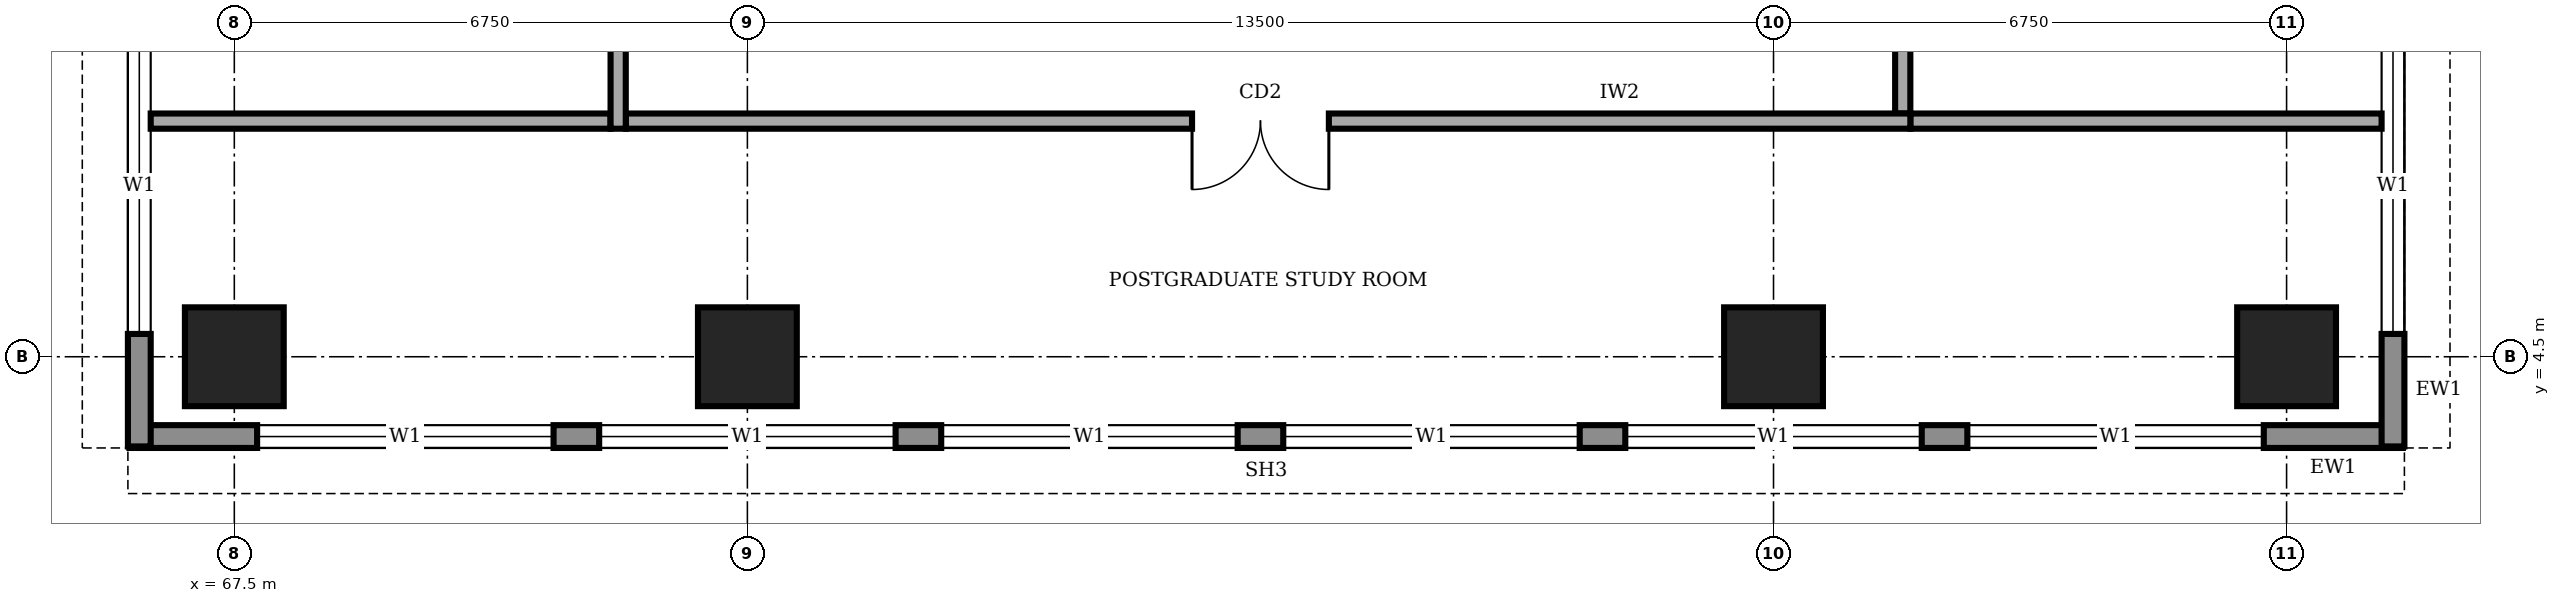
"""IFC4 building model, lengths in metres.
Left out: names, types, materials, properties, quantities, classifications, styles, units other than length and angle.
Written with IfcOpenShell. Run it as: python <this file> out.ifc"""

import sys

from ifc_helpers import new_model, si_unit, direction, frame, frame_2d, origin, origin_2d, place, context, subcontext, project, spatial, rectangle, extrude, element, fill, save


model = new_model("IFC4")
c1 = context("Model", 3, precision=1e-05, world=origin(), true_north=direction((0.0, 1.0)))
c2 = subcontext(c1, "Body", "Model", "MODEL_VIEW")
j1 = project(units=[si_unit("LENGTHUNIT", "METRE"), si_unit("PLANEANGLEUNIT", "RADIAN")], contexts=[c1])
p1 = place(None, origin())
s1 = spatial("IfcSite", under=j1, at=p1, CompositionType="ELEMENT")
p2 = place(p1, origin())
s2 = spatial("IfcBuilding", under=s1, at=p2, CompositionType="ELEMENT")
p3 = place(p2, frame((0.0, 0.0, 213.0)))
s3 = spatial("IfcBuildingStorey", under=s2, at=p3, CompositionType="ELEMENT", Elevation=213.0)
for number, where, z_axis, x_axis in (
    (1, (67.5, 4.5, 0.0), (0.0, 0.0, 1.0), (1.0, 0.0, 0.0)),
    (2, (74.25, 4.5, 0.0), (0.0, 0.0, 1.0), (1.0, 0.0, 0.0)),
    (3, (87.75, 4.5, 0.0), (0.0, 0.0, 1.0), (1.0, 0.0, 0.0)),
    (4, (94.5, 4.5, 0.0), (0.0, 0.0, 1.0), (1.0, 0.0, 0.0)),
):
    element("IfcColumn", number, at=place(p3, frame(where, z_axis=z_axis, x_axis=x_axis)), inside=s3, PredefinedType="COLUMN", context=c2, shape_type="SweptSolid", body=[
        extrude(rectangle(XDim=1.3, YDim=1.3, at=origin_2d()), origin(), (0.0, 0.0, 1.0), 4.0),
    ])
p4 = place(p3, frame((66.12, 3.45, 0.0), z_axis=(0.0, 0.0, 1.0), x_axis=(1.0, 0.0, 0.0)))
e5 = element("IfcWall", 5, at=p4, inside=s3, PredefinedType="STANDARD", context=c2, shape_type="SweptSolid", body=[
    extrude(rectangle(XDim=29.91, YDim=0.3, at=frame_2d((14.955, 0.0))), origin(), (0.0, 0.0, 1.0), 3.75),
])
p5 = place(p4, frame((1.68, 0.0, 0.9)))
e6 = element("IfcOpeningElement", 6, at=p5, cuts=e5, PredefinedType="OPENING", context=c2, shape_type="SweptSolid", body=[
    extrude(rectangle(XDim=3.9, YDim=2.2, at=frame_2d((1.95, 1.1))), frame((0.0, 0.16, 0.0), z_axis=(0.0, -1.0, 0.0), x_axis=(1.0, 0.0, 0.0)), (0.0, 0.0, 1.0), 0.32),
])
p6 = place(p4, frame((6.18, 0.0, 0.9)))
e7 = element("IfcOpeningElement", 7, at=p6, cuts=e5, PredefinedType="OPENING", context=c2, shape_type="SweptSolid", body=[
    extrude(rectangle(XDim=3.9, YDim=2.2, at=frame_2d((1.95, 1.1))), frame((0.0, 0.16, 0.0), z_axis=(0.0, -1.0, 0.0), x_axis=(1.0, 0.0, 0.0)), (0.0, 0.0, 1.0), 0.32),
])
p7 = place(p4, frame((10.68, 0.0, 0.9)))
e8 = element("IfcOpeningElement", 8, at=p7, cuts=e5, PredefinedType="OPENING", context=c2, shape_type="SweptSolid", body=[
    extrude(rectangle(XDim=3.9, YDim=2.2, at=frame_2d((1.95, 1.1))), frame((0.0, 0.16, 0.0), z_axis=(0.0, -1.0, 0.0), x_axis=(1.0, 0.0, 0.0)), (0.0, 0.0, 1.0), 0.32),
])
p8 = place(p4, frame((15.18, 0.0, 0.9)))
e9 = element("IfcOpeningElement", 9, at=p8, cuts=e5, PredefinedType="OPENING", context=c2, shape_type="SweptSolid", body=[
    extrude(rectangle(XDim=3.9, YDim=2.2, at=frame_2d((1.95, 1.1))), frame((0.0, 0.16, 0.0), z_axis=(0.0, -1.0, 0.0), x_axis=(1.0, 0.0, 0.0)), (0.0, 0.0, 1.0), 0.32),
])
p9 = place(p4, frame((19.68, 0.0, 0.9)))
e10 = element("IfcOpeningElement", 10, at=p9, cuts=e5, PredefinedType="OPENING", context=c2, shape_type="SweptSolid", body=[
    extrude(rectangle(XDim=3.9, YDim=2.2, at=frame_2d((1.95, 1.1))), frame((0.0, 0.16, 0.0), z_axis=(0.0, -1.0, 0.0), x_axis=(1.0, 0.0, 0.0)), (0.0, 0.0, 1.0), 0.32),
])
p10 = place(p4, frame((24.18, 0.0, 0.9)))
e11 = element("IfcOpeningElement", 11, at=p10, cuts=e5, PredefinedType="OPENING", context=c2, shape_type="SweptSolid", body=[
    extrude(rectangle(XDim=3.9, YDim=2.2, at=frame_2d((1.95, 1.1))), frame((0.0, 0.16, 0.0), z_axis=(0.0, -1.0, 0.0), x_axis=(1.0, 0.0, 0.0)), (0.0, 0.0, 1.0), 0.32),
])
p11 = place(p3, frame((95.9, 3.32, 0.0), z_axis=(0.0, 0.0, 1.0), x_axis=(0.0, 1.0, 0.0)))
e12 = element("IfcWall", 12, at=p11, inside=s3, PredefinedType="STANDARD", context=c2, shape_type="SweptSolid", body=[
    extrude(rectangle(XDim=33.86, YDim=0.3, at=frame_2d((16.93, 0.0))), origin(), (0.0, 0.0, 1.0), 3.75),
])
p12 = place(p11, frame((1.48, 0.0, 0.9)))
e13 = element("IfcOpeningElement", 13, at=p12, cuts=e12, PredefinedType="OPENING", context=c2, shape_type="SweptSolid", body=[
    extrude(rectangle(XDim=3.9, YDim=2.2, at=frame_2d((1.95, 1.1))), frame((0.0, 0.16, 0.0), z_axis=(0.0, -1.0, 0.0), x_axis=(1.0, 0.0, 0.0)), (0.0, 0.0, 1.0), 0.32),
])
p13 = place(p11, frame((5.98, 0.0, 0.9)))
e14 = element("IfcOpeningElement", 14, at=p13, cuts=e12, PredefinedType="OPENING", context=c2, shape_type="SweptSolid", body=[
    extrude(rectangle(XDim=3.9, YDim=2.2, at=frame_2d((1.95, 1.1))), frame((0.0, 0.16, 0.0), z_axis=(0.0, -1.0, 0.0), x_axis=(1.0, 0.0, 0.0)), (0.0, 0.0, 1.0), 0.32),
])
p14 = place(p11, frame((10.48, 0.0, 0.9)))
e15 = element("IfcOpeningElement", 15, at=p14, cuts=e12, PredefinedType="OPENING", context=c2, shape_type="SweptSolid", body=[
    extrude(rectangle(XDim=3.9, YDim=2.2, at=frame_2d((1.95, 1.1))), frame((0.0, 0.16, 0.0), z_axis=(0.0, -1.0, 0.0), x_axis=(1.0, 0.0, 0.0)), (0.0, 0.0, 1.0), 0.32),
])
p15 = place(p11, frame((14.98, 0.0, 0.9)))
e16 = element("IfcOpeningElement", 16, at=p15, cuts=e12, PredefinedType="OPENING", context=c2, shape_type="SweptSolid", body=[
    extrude(rectangle(XDim=3.9, YDim=2.2, at=frame_2d((1.95, 1.1))), frame((0.0, 0.16, 0.0), z_axis=(0.0, -1.0, 0.0), x_axis=(1.0, 0.0, 0.0)), (0.0, 0.0, 1.0), 0.32),
])
p16 = place(p11, frame((19.48, 0.0, 0.9)))
e17 = element("IfcOpeningElement", 17, at=p16, cuts=e12, PredefinedType="OPENING", context=c2, shape_type="SweptSolid", body=[
    extrude(rectangle(XDim=3.9, YDim=2.2, at=frame_2d((1.95, 1.1))), frame((0.0, 0.16, 0.0), z_axis=(0.0, -1.0, 0.0), x_axis=(1.0, 0.0, 0.0)), (0.0, 0.0, 1.0), 0.32),
])
p17 = place(p11, frame((23.98, 0.0, 0.9)))
e18 = element("IfcOpeningElement", 18, at=p17, cuts=e12, PredefinedType="OPENING", context=c2, shape_type="SweptSolid", body=[
    extrude(rectangle(XDim=3.9, YDim=2.2, at=frame_2d((1.95, 1.1))), frame((0.0, 0.16, 0.0), z_axis=(0.0, -1.0, 0.0), x_axis=(1.0, 0.0, 0.0)), (0.0, 0.0, 1.0), 0.32),
])
p18 = place(p11, frame((28.48, 0.0, 0.9)))
e19 = element("IfcOpeningElement", 19, at=p18, cuts=e12, PredefinedType="OPENING", context=c2, shape_type="SweptSolid", body=[
    extrude(rectangle(XDim=3.9, YDim=2.2, at=frame_2d((1.95, 1.1))), frame((0.0, 0.16, 0.0), z_axis=(0.0, -1.0, 0.0), x_axis=(1.0, 0.0, 0.0)), (0.0, 0.0, 1.0), 0.32),
])
p19 = place(p3, frame((66.25, 37.18, 0.0), z_axis=(0.0, 0.0, 1.0), x_axis=(0.0, -1.0, 0.0)))
e20 = element("IfcWall", 20, at=p19, inside=s3, PredefinedType="STANDARD", context=c2, shape_type="SweptSolid", body=[
    extrude(rectangle(XDim=33.86, YDim=0.3, at=frame_2d((16.93, 0.0))), origin(), (0.0, 0.0, 1.0), 3.75),
])
p20 = place(p19, frame((28.48, 0.0, 0.9)))
e21 = element("IfcOpeningElement", 21, at=p20, cuts=e20, PredefinedType="OPENING", context=c2, shape_type="SweptSolid", body=[
    extrude(rectangle(XDim=3.9, YDim=2.2, at=frame_2d((1.95, 1.1))), frame((0.0, 0.16, 0.0), z_axis=(0.0, -1.0, 0.0), x_axis=(1.0, 0.0, 0.0)), (0.0, 0.0, 1.0), 0.32),
])
p21 = place(p19, frame((23.98, 0.0, 0.9)))
e22 = element("IfcOpeningElement", 22, at=p21, cuts=e20, PredefinedType="OPENING", context=c2, shape_type="SweptSolid", body=[
    extrude(rectangle(XDim=3.9, YDim=2.2, at=frame_2d((1.95, 1.1))), frame((0.0, 0.16, 0.0), z_axis=(0.0, -1.0, 0.0), x_axis=(1.0, 0.0, 0.0)), (0.0, 0.0, 1.0), 0.32),
])
p22 = place(p19, frame((19.48, 0.0, 0.9)))
e23 = element("IfcOpeningElement", 23, at=p22, cuts=e20, PredefinedType="OPENING", context=c2, shape_type="SweptSolid", body=[
    extrude(rectangle(XDim=3.9, YDim=2.2, at=frame_2d((1.95, 1.1))), frame((0.0, 0.16, 0.0), z_axis=(0.0, -1.0, 0.0), x_axis=(1.0, 0.0, 0.0)), (0.0, 0.0, 1.0), 0.32),
])
p23 = place(p19, frame((14.98, 0.0, 0.9)))
e24 = element("IfcOpeningElement", 24, at=p23, cuts=e20, PredefinedType="OPENING", context=c2, shape_type="SweptSolid", body=[
    extrude(rectangle(XDim=3.9, YDim=2.2, at=frame_2d((1.95, 1.1))), frame((0.0, 0.16, 0.0), z_axis=(0.0, -1.0, 0.0), x_axis=(1.0, 0.0, 0.0)), (0.0, 0.0, 1.0), 0.32),
])
p24 = place(p19, frame((10.48, 0.0, 0.9)))
e25 = element("IfcOpeningElement", 25, at=p24, cuts=e20, PredefinedType="OPENING", context=c2, shape_type="SweptSolid", body=[
    extrude(rectangle(XDim=3.9, YDim=2.2, at=frame_2d((1.95, 1.1))), frame((0.0, 0.16, 0.0), z_axis=(0.0, -1.0, 0.0), x_axis=(1.0, 0.0, 0.0)), (0.0, 0.0, 1.0), 0.32),
])
p25 = place(p19, frame((5.98, 0.0, 0.9)))
e26 = element("IfcOpeningElement", 26, at=p25, cuts=e20, PredefinedType="OPENING", context=c2, shape_type="SweptSolid", body=[
    extrude(rectangle(XDim=3.9, YDim=2.2, at=frame_2d((1.95, 1.1))), frame((0.0, 0.16, 0.0), z_axis=(0.0, -1.0, 0.0), x_axis=(1.0, 0.0, 0.0)), (0.0, 0.0, 1.0), 0.32),
])
p26 = place(p19, frame((1.48, 0.0, 0.9)))
e27 = element("IfcOpeningElement", 27, at=p26, cuts=e20, PredefinedType="OPENING", context=c2, shape_type="SweptSolid", body=[
    extrude(rectangle(XDim=3.9, YDim=2.2, at=frame_2d((1.95, 1.1))), frame((0.0, 0.16, 0.0), z_axis=(0.0, -1.0, 0.0), x_axis=(1.0, 0.0, 0.0)), (0.0, 0.0, 1.0), 0.32),
])
p27 = place(p3, frame((72.65, 7.6, 0.0), z_axis=(0.0, 0.0, 1.0), x_axis=(1.0, 0.0, 0.0)))
e28 = element("IfcWall", 28, at=p27, inside=s3, PredefinedType="SOLIDWALL", context=c2, shape_type="SweptSolid", body=[
    extrude(rectangle(XDim=16.9, YDim=0.2, at=frame_2d((8.45, 0.0))), origin(), (0.0, 0.0, 1.0), 3.75),
])
p28 = place(p27, frame((7.45, 0.0, 0.0)))
e29 = element("IfcOpeningElement", 29, at=p28, cuts=e28, PredefinedType="OPENING", context=c2, shape_type="SweptSolid", body=[
    extrude(rectangle(XDim=1.8, YDim=2.1, at=frame_2d((0.9, 1.05))), frame((0.0, 0.11, 0.0), z_axis=(0.0, -1.0, 0.0), x_axis=(1.0, 0.0, 0.0)), (0.0, 0.0, 1.0), 0.22),
])
p29 = place(p3, frame((89.45, 7.7, 0.0), z_axis=(0.0, 0.0, 1.0), x_axis=(0.0, 1.0, 0.0)))
e30 = element("IfcWall", 30, at=p29, inside=s3, PredefinedType="SOLIDWALL", context=c2, shape_type="SweptSolid", body=[
    extrude(rectangle(XDim=23.8, YDim=0.2, at=frame_2d((11.9, 0.0))), origin(), (0.0, 0.0, 1.0), 3.75),
])
p30 = place(p29, frame((2.3, 0.0, 0.0)))
e31 = element("IfcOpeningElement", 31, at=p30, cuts=e30, PredefinedType="OPENING", context=c2, shape_type="SweptSolid", body=[
    extrude(rectangle(XDim=1.0, YDim=2.1, at=frame_2d((0.5, 1.05))), frame((0.0, 0.11, 0.0), z_axis=(0.0, -1.0, 0.0), x_axis=(1.0, 0.0, 0.0)), (0.0, 0.0, 1.0), 0.22),
])
p31 = place(p29, frame((7.05, 0.0, 0.0)))
e32 = element("IfcOpeningElement", 32, at=p31, cuts=e30, PredefinedType="OPENING", context=c2, shape_type="SweptSolid", body=[
    extrude(rectangle(XDim=0.9, YDim=2.1, at=frame_2d((0.45, 1.05))), frame((0.0, 0.11, 0.0), z_axis=(0.0, -1.0, 0.0), x_axis=(1.0, 0.0, 0.0)), (0.0, 0.0, 1.0), 0.22),
])
p32 = place(p29, frame((11.85, 0.0, 0.0)))
e33 = element("IfcOpeningElement", 33, at=p32, cuts=e30, PredefinedType="OPENING", context=c2, shape_type="SweptSolid", body=[
    extrude(rectangle(XDim=0.9, YDim=2.1, at=frame_2d((0.45, 1.05))), frame((0.0, 0.11, 0.0), z_axis=(0.0, -1.0, 0.0), x_axis=(1.0, 0.0, 0.0)), (0.0, 0.0, 1.0), 0.22),
])
p33 = place(p29, frame((14.9, 0.0, 0.0)))
e34 = element("IfcOpeningElement", 34, at=p33, cuts=e30, PredefinedType="OPENING", context=c2, shape_type="SweptSolid", body=[
    extrude(rectangle(XDim=0.9, YDim=2.1, at=frame_2d((0.45, 1.05))), frame((0.0, 0.11, 0.0), z_axis=(0.0, -1.0, 0.0), x_axis=(1.0, 0.0, 0.0)), (0.0, 0.0, 1.0), 0.22),
])
p34 = place(p29, frame((17.8, 0.0, 0.0)))
e35 = element("IfcOpeningElement", 35, at=p34, cuts=e30, PredefinedType="OPENING", context=c2, shape_type="SweptSolid", body=[
    extrude(rectangle(XDim=1.0, YDim=2.1, at=frame_2d((0.5, 1.05))), frame((0.0, 0.11, 0.0), z_axis=(0.0, -1.0, 0.0), x_axis=(1.0, 0.0, 0.0)), (0.0, 0.0, 1.0), 0.22),
])
p35 = place(p29, frame((9.7, 0.0, 0.0)))
e36 = element("IfcOpeningElement", 36, at=p35, cuts=e30, PredefinedType="OPENING", context=c2, shape_type="SweptSolid", body=[
    extrude(rectangle(XDim=1.0, YDim=2.1, at=frame_2d((0.5, 1.05))), frame((0.0, 0.11, 0.0), z_axis=(0.0, -1.0, 0.0), x_axis=(1.0, 0.0, 0.0)), (0.0, 0.0, 1.0), 0.22),
])
p36 = place(p29, frame((21.05, 0.0, 0.0)))
e37 = element("IfcOpeningElement", 37, at=p36, cuts=e30, PredefinedType="OPENING", context=c2, shape_type="SweptSolid", body=[
    extrude(rectangle(XDim=1.0, YDim=2.1, at=frame_2d((0.5, 1.05))), frame((0.0, 0.11, 0.0), z_axis=(0.0, -1.0, 0.0), x_axis=(1.0, 0.0, 0.0)), (0.0, 0.0, 1.0), 0.22),
])
p37 = place(p3, frame((72.55, 31.3, 0.0), z_axis=(0.0, 0.0, 1.0), x_axis=(0.0, -1.0, 0.0)))
e38 = element("IfcWall", 38, at=p37, inside=s3, PredefinedType="SOLIDWALL", context=c2, shape_type="SweptSolid", body=[
    extrude(rectangle(XDim=23.8, YDim=0.2, at=frame_2d((11.9, 0.0))), origin(), (0.0, 0.0, 1.0), 3.75),
])
p38 = place(p37, frame((18.05, 0.0, 0.0)))
e39 = element("IfcOpeningElement", 39, at=p38, cuts=e38, PredefinedType="OPENING", context=c2, shape_type="SweptSolid", body=[
    extrude(rectangle(XDim=1.0, YDim=2.1, at=frame_2d((0.5, 1.05))), frame((0.0, 0.11, 0.0), z_axis=(0.0, -1.0, 0.0), x_axis=(1.0, 0.0, 0.0)), (0.0, 0.0, 1.0), 0.22),
])
p39 = place(p37, frame((6.05, 0.0, 0.0)))
e40 = element("IfcOpeningElement", 40, at=p39, cuts=e38, PredefinedType="OPENING", context=c2, shape_type="SweptSolid", body=[
    extrude(rectangle(XDim=1.0, YDim=2.1, at=frame_2d((0.5, 1.05))), frame((0.0, 0.11, 0.0), z_axis=(0.0, -1.0, 0.0), x_axis=(1.0, 0.0, 0.0)), (0.0, 0.0, 1.0), 0.22),
])
p40 = place(p3, frame((66.4, 7.6, 0.0), z_axis=(0.0, 0.0, 1.0), x_axis=(1.0, 0.0, 0.0)))
e41 = element("IfcWall", 41, at=p40, inside=s3, PredefinedType="SOLIDWALL", context=c2, shape_type="SweptSolid", body=[
    extrude(rectangle(XDim=6.05, YDim=0.2, at=frame_2d((3.025, 0.0))), origin(), (0.0, 0.0, 1.0), 3.75),
])
p41 = place(p3, frame((89.55, 7.6, 0.0), z_axis=(0.0, 0.0, 1.0), x_axis=(1.0, 0.0, 0.0)))
e42 = element("IfcWall", 42, at=p41, inside=s3, PredefinedType="SOLIDWALL", context=c2, shape_type="SweptSolid", body=[
    extrude(rectangle(XDim=6.2, YDim=0.2, at=frame_2d((3.1, 0.0))), origin(), (0.0, 0.0, 1.0), 3.75),
])
p42 = place(p5, origin())
e43 = element("IfcWindow", 43, at=p42, inside=s3, PartitioningType="SINGLE_PANEL", PredefinedType="WINDOW", context=c2, shape_type="SweptSolid", body=[
    extrude(rectangle(XDim=3.9, YDim=2.2, at=frame_2d((1.95, 1.1))), frame((0.0, 0.03, 0.0), z_axis=(0.0, -1.0, 0.0), x_axis=(1.0, 0.0, 0.0)), (0.0, 0.0, 1.0), 0.06),
])
fill(e6, e43)
p43 = place(p6, origin())
e44 = element("IfcWindow", 44, at=p43, inside=s3, PartitioningType="SINGLE_PANEL", PredefinedType="WINDOW", context=c2, shape_type="SweptSolid", body=[
    extrude(rectangle(XDim=3.9, YDim=2.2, at=frame_2d((1.95, 1.1))), frame((0.0, 0.03, 0.0), z_axis=(0.0, -1.0, 0.0), x_axis=(1.0, 0.0, 0.0)), (0.0, 0.0, 1.0), 0.06),
])
fill(e7, e44)
p44 = place(p7, origin())
e45 = element("IfcWindow", 45, at=p44, inside=s3, PartitioningType="SINGLE_PANEL", PredefinedType="WINDOW", context=c2, shape_type="SweptSolid", body=[
    extrude(rectangle(XDim=3.9, YDim=2.2, at=frame_2d((1.95, 1.1))), frame((0.0, 0.03, 0.0), z_axis=(0.0, -1.0, 0.0), x_axis=(1.0, 0.0, 0.0)), (0.0, 0.0, 1.0), 0.06),
])
fill(e8, e45)
p45 = place(p8, origin())
e46 = element("IfcWindow", 46, at=p45, inside=s3, PartitioningType="SINGLE_PANEL", PredefinedType="WINDOW", context=c2, shape_type="SweptSolid", body=[
    extrude(rectangle(XDim=3.9, YDim=2.2, at=frame_2d((1.95, 1.1))), frame((0.0, 0.03, 0.0), z_axis=(0.0, -1.0, 0.0), x_axis=(1.0, 0.0, 0.0)), (0.0, 0.0, 1.0), 0.06),
])
fill(e9, e46)
p46 = place(p9, origin())
e47 = element("IfcWindow", 47, at=p46, inside=s3, PartitioningType="SINGLE_PANEL", PredefinedType="WINDOW", context=c2, shape_type="SweptSolid", body=[
    extrude(rectangle(XDim=3.9, YDim=2.2, at=frame_2d((1.95, 1.1))), frame((0.0, 0.03, 0.0), z_axis=(0.0, -1.0, 0.0), x_axis=(1.0, 0.0, 0.0)), (0.0, 0.0, 1.0), 0.06),
])
fill(e10, e47)
p47 = place(p10, origin())
e48 = element("IfcWindow", 48, at=p47, inside=s3, PartitioningType="SINGLE_PANEL", PredefinedType="WINDOW", context=c2, shape_type="SweptSolid", body=[
    extrude(rectangle(XDim=3.9, YDim=2.2, at=frame_2d((1.95, 1.1))), frame((0.0, 0.03, 0.0), z_axis=(0.0, -1.0, 0.0), x_axis=(1.0, 0.0, 0.0)), (0.0, 0.0, 1.0), 0.06),
])
fill(e11, e48)
p48 = place(p12, origin())
e49 = element("IfcWindow", 49, at=p48, inside=s3, PartitioningType="SINGLE_PANEL", PredefinedType="WINDOW", context=c2, shape_type="SweptSolid", body=[
    extrude(rectangle(XDim=3.9, YDim=2.2, at=frame_2d((1.95, 1.1))), frame((0.0, 0.03, 0.0), z_axis=(0.0, -1.0, 0.0), x_axis=(1.0, 0.0, 0.0)), (0.0, 0.0, 1.0), 0.06),
])
fill(e13, e49)
p49 = place(p20, origin())
e50 = element("IfcWindow", 50, at=p49, inside=s3, PartitioningType="SINGLE_PANEL", PredefinedType="WINDOW", context=c2, shape_type="SweptSolid", body=[
    extrude(rectangle(XDim=3.9, YDim=2.2, at=frame_2d((1.95, 1.1))), frame((0.0, 0.03, 0.0), z_axis=(0.0, -1.0, 0.0), x_axis=(1.0, 0.0, 0.0)), (0.0, 0.0, 1.0), 0.06),
])
fill(e21, e50)
p50 = place(p28, frame((1.8, 0.0, 0.0), z_axis=(0.0, 0.0, 1.0), x_axis=(-1.0, 0.0, 0.0)))
e51 = element("IfcDoor", 51, at=p50, inside=s3, OperationType="DOUBLE_DOOR_SINGLE_SWING", PredefinedType="DOOR", context=c2, shape_type="SweptSolid", body=[
    extrude(rectangle(XDim=1.8, YDim=2.1, at=frame_2d((0.9, 1.05))), frame((0.0, 0.025, 0.0), z_axis=(0.0, -1.0, 0.0), x_axis=(1.0, 0.0, 0.0)), (0.0, 0.0, 1.0), 0.05),
])
fill(e29, e51)
save(model, sys.argv[1])
